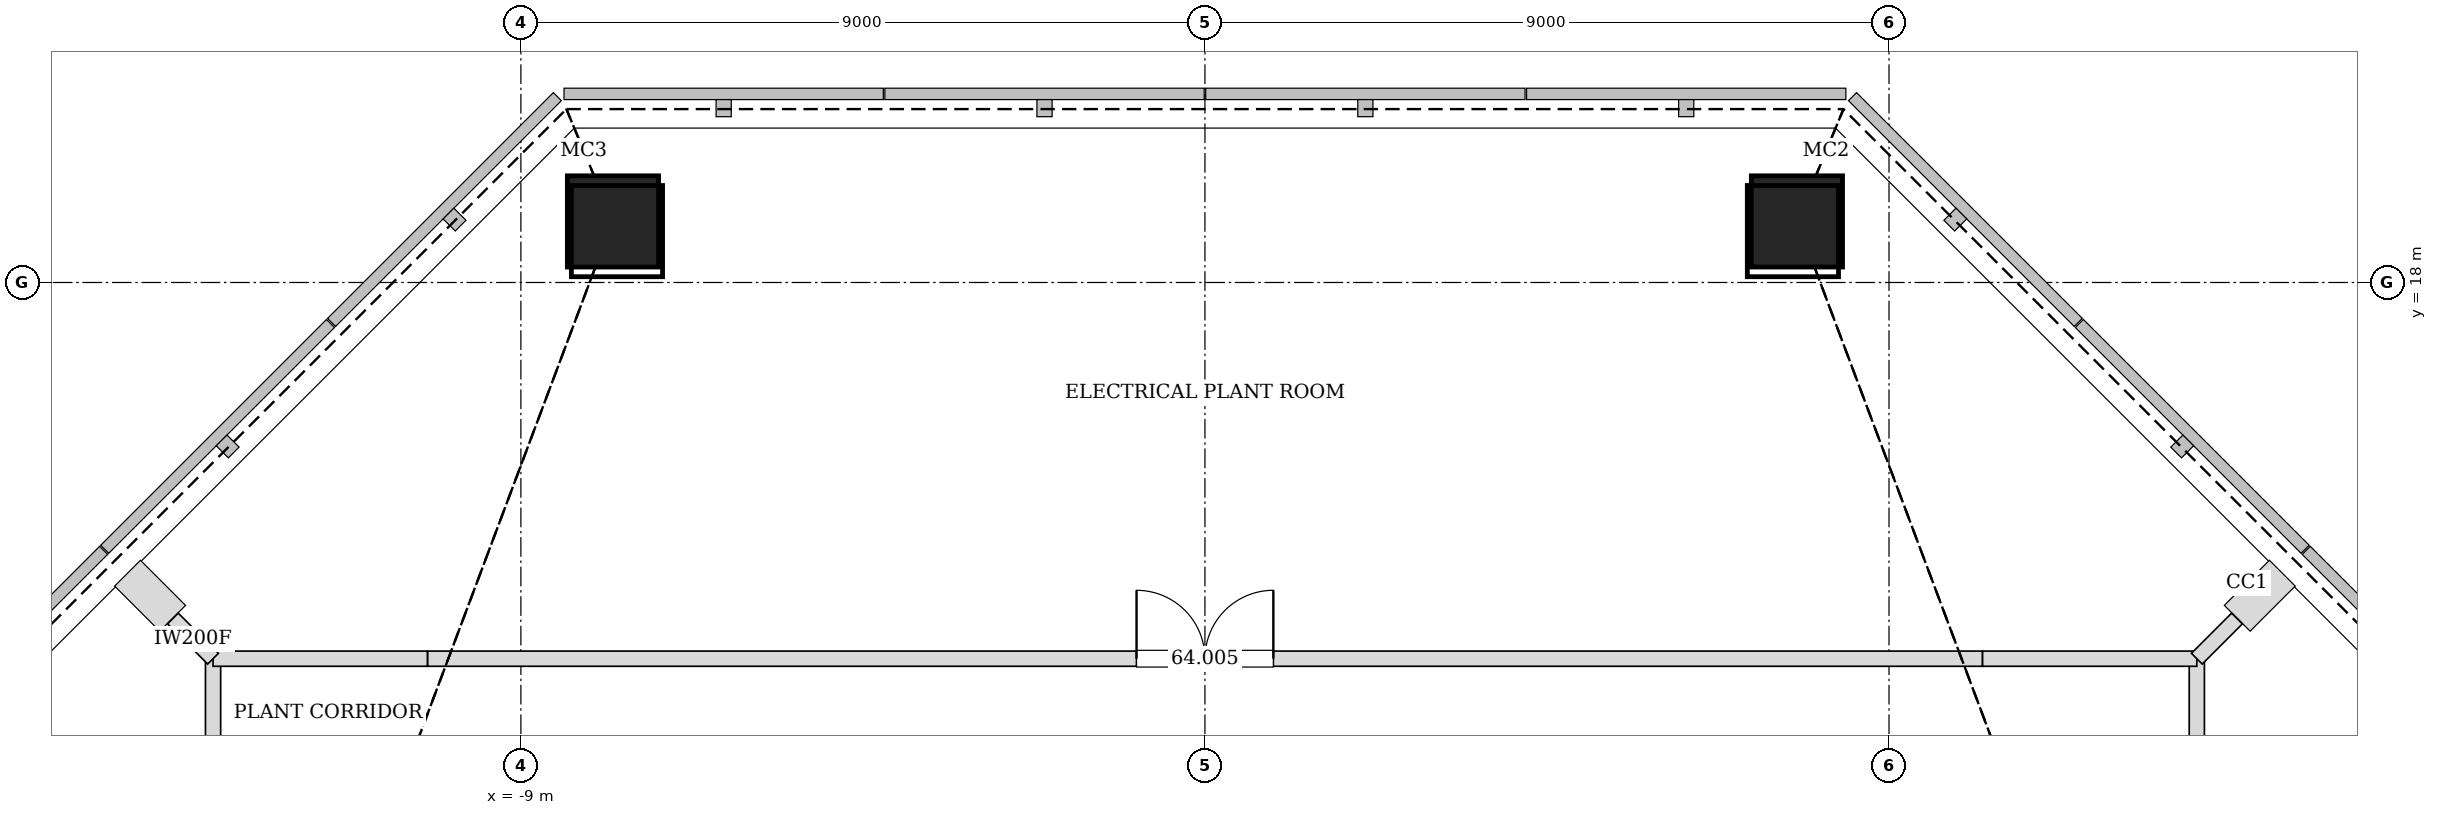
"""IFC4 building model, lengths in metres.
Left out: names, types, materials, properties, quantities, classifications, styles, units other than length and angle.
Written with IfcOpenShell. Run it as: python <this file> out.ifc"""

import sys

from ifc_helpers import new_model, si_unit, direction, frame, frame_2d, origin, origin_2d, place, context, subcontext, project, spatial, rectangle, hollow_rectangle, extrude, element, fill, save


model = new_model("IFC4")
c1 = context("Model", 3, precision=1e-05, world=origin(), true_north=direction((0.0, 1.0)))
c2 = subcontext(c1, "Body", "Model", "MODEL_VIEW")
j1 = project(units=[si_unit("LENGTHUNIT", "METRE"), si_unit("PLANEANGLEUNIT", "RADIAN")], contexts=[c1])
p1 = place(None, origin())
s1 = spatial("IfcSite", under=j1, at=p1, CompositionType="ELEMENT")
p2 = place(p1, origin())
s2 = spatial("IfcBuilding", under=s1, at=p2, CompositionType="ELEMENT")
p3 = place(p2, frame((0.0, 0.0, 266.3)))
s3 = spatial("IfcBuildingStorey", under=s2, at=p3, CompositionType="ELEMENT", Elevation=266.3)
for number, where, z_axis, x_axis in (
    (1, (7.789, 18.803, 0.0), (-0.012, -0.028, 1.0), (0.924, -0.383, 0.0)),
    (2, (-7.789, 18.803, 0.0), (0.012, -0.028, 1.0), (0.924, 0.383, 0.0)),
):
    element("IfcColumn", number, at=place(p3, frame(where, z_axis=z_axis, x_axis=x_axis)), inside=s3, PredefinedType="COLUMN", context=c2, shape_type="SweptSolid", body=[
        extrude(hollow_rectangle(XDim=1.2, YDim=1.2, WallThickness=0.055, at=origin_2d()), origin(), (0.0, 0.0, 1.0), 4.502),
    ])
for number, where, z_axis, x_axis in (
    (3, (13.05, 10.23, 0.0), (0.0, 0.0, 1.0), (0.0, 1.0, 0.0)),
    (4, (-13.05, 13.05, 0.0), (0.0, 0.0, 1.0), (0.0, -1.0, 0.0)),
    (5, (13.05, 13.05, 0.0), (0.0, 0.0, 1.0), (-1.0, 0.0, 0.0)),
):
    element("IfcWall", number, at=place(p3, frame(where, z_axis=z_axis, x_axis=x_axis)), inside=s3, PredefinedType="PARTITIONING", context=c2, shape_type="SweptSolid", body=[
        extrude(rectangle(XDim=2.82, YDim=0.2, at=frame_2d((1.41, 0.0))), origin(), (0.0, 0.0, 1.0), 3.678),
    ])
p4 = place(p3, frame((10.228, 13.05, 0.0), z_axis=(0.0, 0.0, 1.0), x_axis=(-1.0, 0.0, 0.0)))
e6 = element("IfcWall", 6, at=p4, inside=s3, PredefinedType="PARTITIONING", context=c2, shape_type="SweptSolid", body=[
    extrude(rectangle(XDim=20.456, YDim=0.2, at=frame_2d((10.228, 0.0))), origin(), (0.0, 0.0, 1.0), 3.363),
])
p5 = place(p4, frame((9.328, 0.0, 0.0)))
e7 = element("IfcOpeningElement", 7, at=p5, cuts=e6, PredefinedType="OPENING", context=c2, shape_type="SweptSolid", body=[
    extrude(rectangle(XDim=1.8, YDim=2.4, at=frame_2d((0.9, 1.2))), frame((0.0, 0.11, 0.0), z_axis=(0.0, -1.0, 0.0), x_axis=(1.0, 0.0, 0.0)), (0.0, 0.0, 1.0), 0.22),
])
p6 = place(p3, frame((-10.23, 13.05, 0.0), z_axis=(0.0, 0.0, 1.0), x_axis=(-1.0, 0.0, 0.0)))
e8 = element("IfcWall", 8, at=p6, inside=s3, PredefinedType="PARTITIONING", context=c2, shape_type="SweptSolid", body=[
    extrude(rectangle(XDim=2.82, YDim=0.2, at=frame_2d((1.41, 0.0))), origin(), (0.0, 0.0, 1.0), 3.678),
])
for number, where, z_axis, x_axis in (
    (9, (13.579, 13.579, 0.0), (0.0, 0.0, 1.0), (-0.707, -0.707, 0.0)),
    (10, (-13.05, 13.05, 0.0), (0.0, 0.0, 1.0), (-0.707, 0.707, 0.0)),
):
    element("IfcWall", number, at=place(p3, frame(where, z_axis=z_axis, x_axis=x_axis)), inside=s3, PredefinedType="PARTITIONING", context=c2, shape_type="SweptSolid", body=[
        extrude(rectangle(XDim=0.748, YDim=0.2, at=frame_2d((0.374, 0.0))), origin(), (0.0, 0.0, 1.0), 3.678),
    ])
p7 = place(p5, frame((1.8, 0.0, 0.0), z_axis=(0.0, 0.0, 1.0), x_axis=(-1.0, 0.0, 0.0)))
e11 = element("IfcDoor", 11, at=p7, inside=s3, OperationType="DOUBLE_DOOR_SINGLE_SWING", PredefinedType="DOOR", context=c2, shape_type="SweptSolid", body=[
    extrude(rectangle(XDim=1.8, YDim=2.4, at=frame_2d((0.9, 1.2))), frame((0.0, 0.025, 0.0), z_axis=(0.0, -1.0, 0.0), x_axis=(1.0, 0.0, 0.0)), (0.0, 0.0, 1.0), 0.05),
])
fill(e7, e11)
save(model, sys.argv[1])
